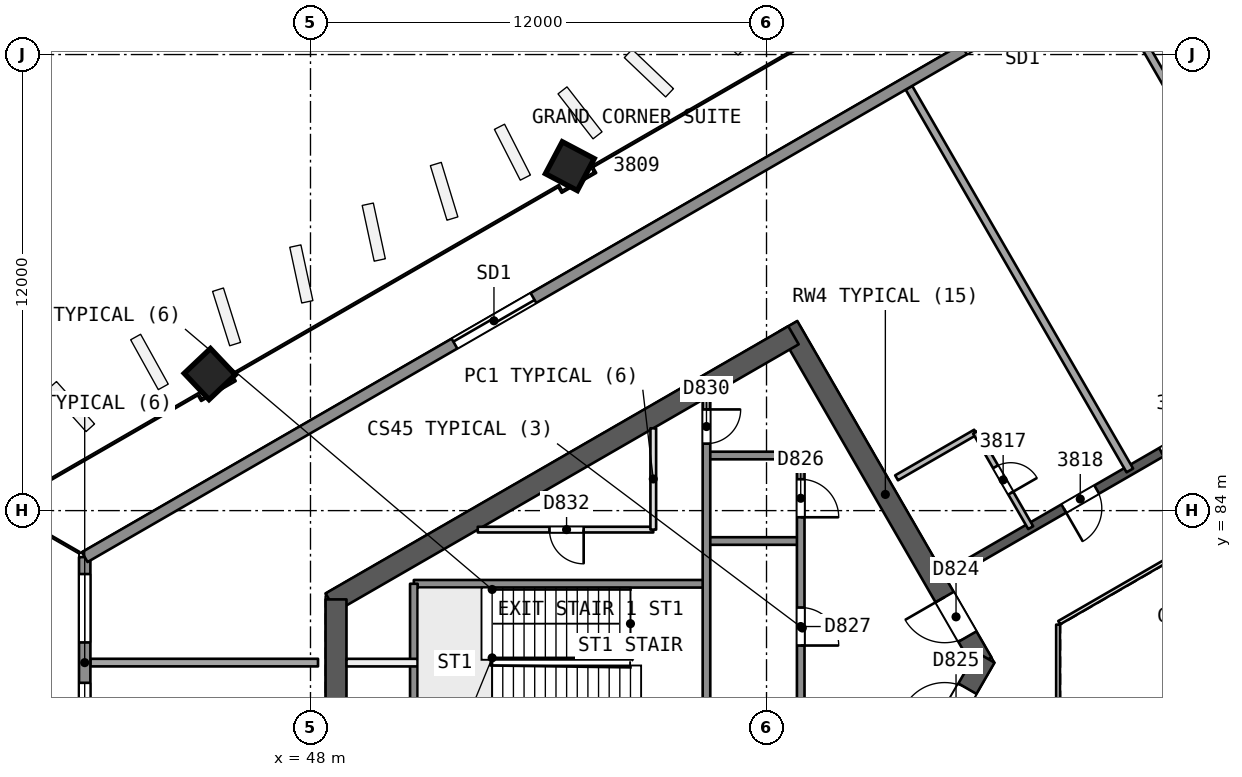
"""IFC4 building model, lengths in metres.
Left out: names, types, materials, properties, quantities, classifications, styles, units other than length and angle.
Written with IfcOpenShell. Run it as: python <this file> out.ifc"""

import sys

from ifc_helpers import new_model, si_unit, direction, frame, frame_2d, origin, origin_2d, place, context, subcontext, project, spatial, rectangle, extrude, element, fill, save


model = new_model("IFC4")
c1 = context("Model", 3, precision=1e-05, world=origin(), true_north=direction((0.0, 1.0)))
c2 = subcontext(c1, "Body", "Model", "MODEL_VIEW")
j1 = project(units=[si_unit("LENGTHUNIT", "METRE"), si_unit("PLANEANGLEUNIT", "RADIAN")], contexts=[c1])
p1 = place(None, origin())
s1 = spatial("IfcSite", under=j1, at=p1, CompositionType="ELEMENT")
p2 = place(p1, origin())
s2 = spatial("IfcBuilding", under=s1, at=p2, CompositionType="ELEMENT")
p3 = place(p2, frame((0.0, 0.0, 160.0)))
s3 = spatial("IfcBuildingStorey", under=s2, at=p3, CompositionType="ELEMENT", Elevation=160.0)
p4 = place(p3, frame((65.682, 80.0, 0.0), z_axis=(0.0, 0.0, 1.0), x_axis=(-0.500000202252, 0.866025287014, 0.0)))
e1 = element("IfcWall", 1, at=p4, inside=s3, PredefinedType="SHEAR", context=c2, shape_type="SweptSolid", body=[
    extrude(rectangle(XDim=10.221, YDim=0.55, at=frame_2d((5.111, 0.0))), origin(), (0.0, 0.0, 1.0), 3.7),
])
p5 = place(p4, frame((0.791, 0.0, 0.0)))
e2 = element("IfcOpeningElement", 2, at=p5, cuts=e1, PredefinedType="OPENING", context=c2, shape_type="SweptSolid", body=[
    extrude(rectangle(XDim=1.2, YDim=2.1, at=frame_2d((0.6, 1.05))), frame((0.0, 0.286, 0.0), z_axis=(0.0, -1.0, 0.0), x_axis=(1.0, 0.0, 0.0)), (0.0, 0.0, 1.0), 0.571),
])
p6 = place(p3, frame((60.709, 88.614, 0.0), z_axis=(0.0, 0.0, 1.0), x_axis=(-0.866020164116, -0.500009075263, 0.0)))
e3 = element("IfcWall", 3, at=p6, inside=s3, PredefinedType="SHEAR", context=c2, shape_type="SweptSolid", body=[
    extrude(rectangle(XDim=14.058, YDim=0.55, at=frame_2d((7.029, 0.0))), origin(), (0.0, 0.0, 1.0), 3.7),
])
p7 = place(p3, frame((48.672, 81.664, 0.0), z_axis=(0.0, 0.0, 1.0), x_axis=(0.0, -1.0, 0.0)))
e4 = element("IfcWall", 4, at=p7, inside=s3, PredefinedType="SHEAR", context=c2, shape_type="SweptSolid", body=[
    extrude(rectangle(XDim=3.487, YDim=0.55, at=frame_2d((1.743, 0.0))), origin(), (0.0, 0.0, 1.0), 3.7),
])
p8 = place(p3, frame((60.709, 71.386, 0.0), z_axis=(0.0, 0.0, 1.0), x_axis=(0.500015938302, 0.866016201606, 0.0)))
e5 = element("IfcWall", 5, at=p8, inside=s3, PredefinedType="SHEAR", context=c2, shape_type="SweptSolid", body=[
    extrude(rectangle(XDim=10.105, YDim=0.55, at=frame_2d((5.053, 0.0))), origin(), (0.0, 0.0, 1.0), 3.7),
])
p9 = place(p8, frame((7.955, 0.0, 0.0)))
e6 = element("IfcOpeningElement", 6, at=p9, cuts=e5, PredefinedType="OPENING", context=c2, shape_type="SweptSolid", body=[
    extrude(rectangle(XDim=1.2, YDim=2.1, at=frame_2d((0.6, 1.05))), frame((0.0, 0.286, 0.0), z_axis=(0.0, -1.0, 0.0), x_axis=(1.0, 0.0, 0.0)), (0.0, 0.0, 1.0), 0.571),
])
p10 = place(p3, frame((78.2, 90.046, 0.0), z_axis=(0.0, 0.0, 1.0), x_axis=(-0.866026492143, -0.499998114903, 0.0)))
e7 = element("IfcWall", 7, at=p10, inside=s3, PredefinedType="SHEAR", context=c2, shape_type="SweptSolid", body=[
    extrude(rectangle(XDim=15.588, YDim=0.25, at=frame_2d((7.794, 0.0))), origin(), (0.0, 0.0, 1.0), 3.25),
])
p11 = place(p10, frame((1.527, 0.0, 0.0)))
e8 = element("IfcOpeningElement", 8, at=p11, cuts=e7, PredefinedType="OPENING", context=c2, shape_type="SweptSolid", body=[
    extrude(rectangle(XDim=1.0, YDim=2.1, at=frame_2d((0.5, 1.05))), frame((0.0, 0.135, 0.0), z_axis=(0.0, -1.0, 0.0), x_axis=(1.0, 0.0, 0.0)), (0.0, 0.0, 1.0), 0.271),
])
p12 = place(p10, frame((7.915, 0.0, 0.0)))
e9 = element("IfcOpeningElement", 9, at=p12, cuts=e7, PredefinedType="OPENING", context=c2, shape_type="SweptSolid", body=[
    extrude(rectangle(XDim=1.1, YDim=2.1, at=frame_2d((0.55, 1.05))), frame((0.0, 0.135, 0.0), z_axis=(0.0, -1.0, 0.0), x_axis=(1.0, 0.0, 0.0)), (0.0, 0.0, 1.0), 0.271),
])
p13 = place(p10, frame((10.982, 0.0, 0.0)))
e10 = element("IfcOpeningElement", 10, at=p13, cuts=e7, PredefinedType="OPENING", context=c2, shape_type="SweptSolid", body=[
    extrude(rectangle(XDim=1.0, YDim=2.1, at=frame_2d((0.5, 1.05))), frame((0.0, 0.135, 0.0), z_axis=(0.0, -1.0, 0.0), x_axis=(1.0, 0.0, 0.0)), (0.0, 0.0, 1.0), 0.271),
])
p14 = place(p3, frame((54.801, 93.078, 0.0), z_axis=(0.019328516974, -0.012138044789, 0.999739504221), x_axis=(-0.500208848309, 0.865669585777, 0.020181088508)))
e11 = element("IfcColumn", 11, at=p14, inside=s3, PredefinedType="COLUMN", context=c2, shape_type="SweptSolid", body=[
    extrude(rectangle(XDim=0.95, YDim=0.95, at=origin_2d()), origin(), (0.0, 0.0, 1.0), 3.701),
])
p15 = place(p3, frame((45.315, 87.601, 0.0), z_axis=(0.02855911485, -0.006793507689, 0.999569019734), x_axis=(-0.500413533487, 0.865551301346, 0.020180194262)))
e12 = element("IfcColumn", 12, at=p15, inside=s3, PredefinedType="COLUMN", context=c2, shape_type="SweptSolid", body=[
    extrude(rectangle(XDim=0.95, YDim=0.95, at=origin_2d()), origin(), (0.0, 0.0, 1.0), 3.702),
])
p16 = place(p3, frame((68.877, 98.088, 0.0), z_axis=(0.0, 0.0, 1.0), x_axis=(0.500001735503, -0.866024401789, 0.0)))
e13 = element("IfcWall", 13, at=p16, inside=s3, PredefinedType="PARTITIONING", context=c2, shape_type="SweptSolid", body=[
    extrude(rectangle(XDim=8.626, YDim=0.2, at=frame_2d((4.313, 0.0))), origin(), (0.0, 0.0, 1.0), 3.25),
])
p17 = place(p3, frame((63.747, 95.126, 0.0), z_axis=(0.0, 0.0, 1.0), x_axis=(0.4999987432, -0.866026129397, 0.0)))
e14 = element("IfcWall", 14, at=p17, inside=s3, PredefinedType="PARTITIONING", context=c2, shape_type="SweptSolid", body=[
    extrude(rectangle(XDim=11.626, YDim=0.2, at=frame_2d((5.813, 0.0))), origin(), (0.0, 0.0, 1.0), 3.25),
])
p18 = place(p3, frame((63.422, 84.863, 0.0), z_axis=(0.0, 0.0, 1.0), x_axis=(0.865994240961, 0.500053971709, 0.0)))
e15 = element("IfcWall", 15, at=p18, inside=s3, PredefinedType="PARTITIONING", context=c2, shape_type="SweptSolid", body=[
    extrude(rectangle(XDim=2.401, YDim=0.15, at=frame_2d((1.201, 0.0))), origin(), (0.0, 0.0, 1.0), 3.25),
])
p19 = place(p3, frame((65.502, 86.063, 0.0), z_axis=(0.0, 0.0, 1.0), x_axis=(0.499987231761, -0.866032775405, 0.0)))
e16 = element("IfcWall", 16, at=p19, inside=s3, PredefinedType="PARTITIONING", context=c2, shape_type="SweptSolid", body=[
    extrude(rectangle(XDim=2.9, YDim=0.15, at=frame_2d((1.45, 0.0))), origin(), (0.0, 0.0, 1.0), 3.25),
])
p20 = place(p19, frame((1.05, 0.0, 0.0)))
e17 = element("IfcOpeningElement", 17, at=p20, cuts=e16, PredefinedType="OPENING", context=c2, shape_type="SweptSolid", body=[
    extrude(rectangle(XDim=0.8, YDim=2.1, at=frame_2d((0.4, 1.05))), frame((0.0, 0.085, 0.0), z_axis=(0.0, -1.0, 0.0), x_axis=(1.0, 0.0, 0.0)), (0.0, 0.0, 1.0), 0.171),
])
p21 = place(p3, frame((42.208, 80.001, 0.0), z_axis=(0.0, 0.0, 1.0), x_axis=(1.0, 0.0, 0.0)))
e18 = element("IfcWall", 18, at=p21, inside=s3, PredefinedType="PARTITIONING", context=c2, shape_type="SweptSolid", body=[
    extrude(rectangle(XDim=5.99, YDim=0.2, at=frame_2d((2.995, 0.0))), origin(), (0.0, 0.0, 1.0), 3.25),
])
p22 = place(p3, frame((42.059, 77.223, 0.0), z_axis=(0.0, 0.0, 1.0), x_axis=(0.0, 1.0, 0.0)))
e19 = element("IfcWall", 19, at=p22, inside=s3, PredefinedType="SOLIDWALL", context=c2, shape_type="SweptSolid", body=[
    extrude(rectangle(XDim=5.554, YDim=0.3, at=frame_2d((2.777, 0.0))), origin(), (0.0, 0.0, 1.0), 3.25),
])
p23 = place(p22, frame((0.446, 0.0, 0.9)))
e20 = element("IfcOpeningElement", 20, at=p23, cuts=e19, PredefinedType="OPENING", context=c2, shape_type="SweptSolid", body=[
    extrude(rectangle(XDim=1.8, YDim=1.5, at=frame_2d((0.9, 0.75))), frame((0.0, 0.161, 0.0), z_axis=(0.0, -1.0, 0.0), x_axis=(1.0, 0.0, 0.0)), (0.0, 0.0, 1.0), 0.321),
])
p24 = place(p22, frame((3.308, 0.0, 0.9)))
e21 = element("IfcOpeningElement", 21, at=p24, cuts=e19, PredefinedType="OPENING", context=c2, shape_type="SweptSolid", body=[
    extrude(rectangle(XDim=1.8, YDim=1.5, at=frame_2d((0.9, 0.75))), frame((0.0, 0.161, 0.0), z_axis=(0.0, -1.0, 0.0), x_axis=(1.0, 0.0, 0.0)), (0.0, 0.0, 1.0), 0.321),
])
p25 = place(p3, frame((42.059, 82.777, 0.0), z_axis=(0.0, 0.0, 1.0), x_axis=(0.866025745652, 0.499999407868, 0.0)))
e22 = element("IfcWall", 22, at=p25, inside=s3, PredefinedType="SOLIDWALL", context=c2, shape_type="SweptSolid", body=[
    extrude(rectangle(XDim=54.279, YDim=0.3, at=frame_2d((27.14, 0.0))), origin(), (0.0, 0.0, 1.0), 3.25),
])
p26 = place(p25, frame((26.719, 0.0, 0.0)))
e23 = element("IfcOpeningElement", 23, at=p26, cuts=e22, PredefinedType="OPENING", context=c2, shape_type="SweptSolid", body=[
    extrude(rectangle(XDim=2.4, YDim=2.4, at=frame_2d((1.2, 1.2))), frame((0.0, 0.161, 0.0), z_axis=(0.0, -1.0, 0.0), x_axis=(1.0, 0.0, 0.0)), (0.0, 0.0, 1.0), 0.321),
])
p27 = place(p25, frame((31.708, 0.0, 0.0)))
e24 = element("IfcOpeningElement", 24, at=p27, cuts=e22, PredefinedType="OPENING", context=c2, shape_type="SweptSolid", body=[
    extrude(rectangle(XDim=2.4, YDim=2.4, at=frame_2d((1.2, 1.2))), frame((0.0, 0.161, 0.0), z_axis=(0.0, -1.0, 0.0), x_axis=(1.0, 0.0, 0.0)), (0.0, 0.0, 1.0), 0.321),
])
p28 = place(p25, frame((42.175, 0.0, 0.0)))
e25 = element("IfcOpeningElement", 25, at=p28, cuts=e22, PredefinedType="OPENING", context=c2, shape_type="SweptSolid", body=[
    extrude(rectangle(XDim=2.4, YDim=2.4, at=frame_2d((1.2, 1.2))), frame((0.0, 0.161, 0.0), z_axis=(0.0, -1.0, 0.0), x_axis=(1.0, 0.0, 0.0)), (0.0, 0.0, 1.0), 0.321),
])
p29 = place(p25, frame((11.235, 0.0, 0.0)))
e26 = element("IfcOpeningElement", 26, at=p29, cuts=e22, PredefinedType="OPENING", context=c2, shape_type="SweptSolid", body=[
    extrude(rectangle(XDim=2.4, YDim=2.4, at=frame_2d((1.2, 1.2))), frame((0.0, 0.161, 0.0), z_axis=(0.0, -1.0, 0.0), x_axis=(1.0, 0.0, 0.0)), (0.0, 0.0, 1.0), 0.321),
])
p30 = place(p3, frame((60.9, 85.45, 0.0), z_axis=(0.0, 0.0, 1.0), x_axis=(-1.0, 0.0, 0.0)))
e27 = element("IfcWall", 27, at=p30, inside=s3, PredefinedType="SOLIDWALL", context=c2, shape_type="SweptSolid", body=[
    extrude(rectangle(XDim=2.48, YDim=0.2, at=frame_2d((1.24, 0.0))), origin(), (0.0, 0.0, 1.0), 3.25),
])
p31 = place(p3, frame((57.02, 83.5, 0.0), z_axis=(0.0, 0.0, 1.0), x_axis=(-1.0, 0.0, 0.0)))
e28 = element("IfcWall", 28, at=p31, inside=s3, PredefinedType="PARTITIONING", context=c2, shape_type="SweptSolid", body=[
    extrude(rectangle(XDim=4.618, YDim=0.15, at=frame_2d((2.309, 0.0))), origin(), (0.0, 0.0, 1.0), 3.25),
])
p32 = place(p31, frame((1.832, 0.0, 0.0)))
e29 = element("IfcOpeningElement", 29, at=p32, cuts=e28, PredefinedType="OPENING", context=c2, shape_type="SweptSolid", body=[
    extrude(rectangle(XDim=0.9, YDim=2.1, at=frame_2d((0.45, 1.05))), frame((0.0, 0.085, 0.0), z_axis=(0.0, -1.0, 0.0), x_axis=(1.0, 0.0, 0.0)), (0.0, 0.0, 1.0), 0.171),
])
p33 = place(p3, frame((60.9, 83.2, 0.0), z_axis=(0.0, 0.0, 1.0), x_axis=(-1.0, 0.0, 0.0)))
e30 = element("IfcWall", 30, at=p33, inside=s3, PredefinedType="SOLIDWALL", context=c2, shape_type="SweptSolid", body=[
    extrude(rectangle(XDim=2.48, YDim=0.2, at=frame_2d((1.24, 0.0))), origin(), (0.0, 0.0, 1.0), 3.25),
])
p34 = place(p3, frame((58.42, 82.075, 0.0), z_axis=(0.0, 0.0, 1.0), x_axis=(-1.0, 0.0, 0.0)))
e31 = element("IfcWall", 31, at=p34, inside=s3, PredefinedType="SOLIDWALL", context=c2, shape_type="SweptSolid", body=[
    extrude(rectangle(XDim=7.7, YDim=0.2, at=frame_2d((3.85, 0.0))), origin(), (0.0, 0.0, 1.0), 3.25),
])
p35 = place(p3, frame((50.82, 80.0, 0.0), z_axis=(0.0, 0.0, 1.0), x_axis=(-1.0, 0.0, 0.0)))
e32 = element("IfcWall", 32, at=p35, inside=s3, PredefinedType="PARTITIONING", context=c2, shape_type="SweptSolid", body=[
    extrude(rectangle(XDim=1.873, YDim=0.2, at=frame_2d((0.937, 0.0))), origin(), (0.0, 0.0, 1.0), 3.25),
])
p36 = place(p3, frame((60.9, 85.45, 0.0), z_axis=(0.0, 0.0, 1.0), x_axis=(0.0, -1.0, 0.0)))
e33 = element("IfcWall", 33, at=p36, inside=s3, PredefinedType="SOLIDWALL", context=c2, shape_type="SweptSolid", body=[
    extrude(rectangle(XDim=10.9, YDim=0.2, at=frame_2d((5.45, 0.0))), origin(), (0.0, 0.0, 1.0), 3.25),
])
p37 = place(p36, frame((0.625, 0.0, 0.0)))
e34 = element("IfcOpeningElement", 34, at=p37, cuts=e33, PredefinedType="OPENING", context=c2, shape_type="SweptSolid", body=[
    extrude(rectangle(XDim=1.0, YDim=2.1, at=frame_2d((0.5, 1.05))), frame((0.0, 0.11, 0.0), z_axis=(0.0, -1.0, 0.0), x_axis=(1.0, 0.0, 0.0)), (0.0, 0.0, 1.0), 0.221),
])
p38 = place(p36, frame((4.0, 0.0, 0.0)))
e35 = element("IfcOpeningElement", 35, at=p38, cuts=e33, PredefinedType="OPENING", context=c2, shape_type="SweptSolid", body=[
    extrude(rectangle(XDim=1.0, YDim=2.1, at=frame_2d((0.5, 1.05))), frame((0.0, 0.11, 0.0), z_axis=(0.0, -1.0, 0.0), x_axis=(1.0, 0.0, 0.0)), (0.0, 0.0, 1.0), 0.221),
])
p39 = place(p36, frame((7.375, 0.0, 0.0)))
e36 = element("IfcOpeningElement", 36, at=p39, cuts=e33, PredefinedType="OPENING", context=c2, shape_type="SweptSolid", body=[
    extrude(rectangle(XDim=1.0, YDim=2.1, at=frame_2d((0.5, 1.05))), frame((0.0, 0.11, 0.0), z_axis=(0.0, -1.0, 0.0), x_axis=(1.0, 0.0, 0.0)), (0.0, 0.0, 1.0), 0.221),
])
p40 = place(p3, frame((58.42, 86.974, 0.0), z_axis=(0.0, 0.0, 1.0), x_axis=(0.0, -1.0, 0.0)))
e37 = element("IfcWall", 37, at=p40, inside=s3, PredefinedType="SOLIDWALL", context=c2, shape_type="SweptSolid", body=[
    extrude(rectangle(XDim=10.524, YDim=0.2, at=frame_2d((5.262, 0.0))), origin(), (0.0, 0.0, 1.0), 3.25),
])
p41 = place(p40, frame((0.312, 0.0, 0.0)))
e38 = element("IfcOpeningElement", 38, at=p41, cuts=e37, PredefinedType="OPENING", context=c2, shape_type="SweptSolid", body=[
    extrude(rectangle(XDim=0.9, YDim=2.1, at=frame_2d((0.45, 1.05))), frame((0.0, 0.11, 0.0), z_axis=(0.0, -1.0, 0.0), x_axis=(1.0, 0.0, 0.0)), (0.0, 0.0, 1.0), 0.221),
])
p42 = place(p3, frame((57.02, 86.166, 0.0), z_axis=(0.0, 0.0, 1.0), x_axis=(0.0, -1.0, 0.0)))
e39 = element("IfcWall", 39, at=p42, inside=s3, PredefinedType="PARTITIONING", context=c2, shape_type="SweptSolid", body=[
    extrude(rectangle(XDim=2.666, YDim=0.15, at=frame_2d((1.333, 0.0))), origin(), (0.0, 0.0, 1.0), 3.25),
])
p43 = place(p3, frame((50.72, 82.075, 0.0), z_axis=(0.0, 0.0, 1.0), x_axis=(0.0, -1.0, 0.0)))
e40 = element("IfcWall", 40, at=p43, inside=s3, PredefinedType="SOLIDWALL", context=c2, shape_type="SweptSolid", body=[
    extrude(rectangle(XDim=4.15, YDim=0.2, at=frame_2d((2.075, 0.0))), origin(), (0.0, 0.0, 1.0), 3.25),
])
p44 = place(p3, frame((77.738, 86.846, 0.0), z_axis=(0.0, 0.0, 1.0), x_axis=(-0.866026658274, -0.499997827154, 0.0)))
e41 = element("IfcWall", 41, at=p44, inside=s3, PredefinedType="PARTITIONING", context=c2, shape_type="SweptSolid", body=[
    extrude(rectangle(XDim=11.588, YDim=0.1, at=frame_2d((5.794, 0.0))), origin(), (0.0, 0.0, 1.0), 3.25),
])
p45 = place(p3, frame((67.672, 81.0, 0.0), z_axis=(0.0, 0.0, 1.0), x_axis=(0.0, -1.0, 0.0)))
e42 = element("IfcWall", 42, at=p45, inside=s3, PredefinedType="PARTITIONING", context=c2, shape_type="SweptSolid", body=[
    extrude(rectangle(XDim=2.0, YDim=0.1, at=frame_2d((1.0, 0.0))), origin(), (0.0, 0.0, 1.0), 3.25),
])
p46 = place(p12, origin())
e43 = element("IfcDoor", 43, at=p46, inside=s3, OperationType="SINGLE_SWING_RIGHT", PredefinedType="NOTDEFINED", context=c2, shape_type="SweptSolid", body=[
    extrude(rectangle(XDim=1.1, YDim=2.1, at=frame_2d((0.55, 1.05))), frame((0.0, 0.025, 0.0), z_axis=(0.0, -1.0, 0.0), x_axis=(1.0, 0.0, 0.0)), (0.0, 0.0, 1.0), 0.05),
])
fill(e9, e43)
p47 = place(p20, origin())
e44 = element("IfcDoor", 44, at=p47, inside=s3, OperationType="SINGLE_SWING_RIGHT", PredefinedType="NOTDEFINED", context=c2, shape_type="SweptSolid", body=[
    extrude(rectangle(XDim=0.8, YDim=2.1, at=frame_2d((0.4, 1.05))), frame((0.0, 0.025, 0.0), z_axis=(0.0, -1.0, 0.0), x_axis=(1.0, 0.0, 0.0)), (0.0, 0.0, 1.0), 0.05),
])
fill(e17, e44)
p48 = place(p13, origin())
e45 = element("IfcDoor", 45, at=p48, inside=s3, OperationType="SINGLE_SWING_RIGHT", PredefinedType="NOTDEFINED", context=c2, shape_type="SweptSolid", body=[
    extrude(rectangle(XDim=1.0, YDim=2.1, at=frame_2d((0.5, 1.05))), frame((0.0, 0.025, 0.0), z_axis=(0.0, -1.0, 0.0), x_axis=(1.0, 0.0, 0.0)), (0.0, 0.0, 1.0), 0.05),
])
fill(e10, e45)
p49 = place(p23, origin())
e46 = element("IfcWindow", 46, at=p49, inside=s3, PartitioningType="SINGLE_PANEL", PredefinedType="WINDOW", context=c2, shape_type="SweptSolid", body=[
    extrude(rectangle(XDim=1.8, YDim=1.5, at=frame_2d((0.9, 0.75))), frame((0.0, 0.03, 0.0), z_axis=(0.0, -1.0, 0.0), x_axis=(1.0, 0.0, 0.0)), (0.0, 0.0, 1.0), 0.06),
])
fill(e20, e46)
p50 = place(p24, origin())
e47 = element("IfcWindow", 47, at=p50, inside=s3, PartitioningType="SINGLE_PANEL", PredefinedType="WINDOW", context=c2, shape_type="SweptSolid", body=[
    extrude(rectangle(XDim=1.8, YDim=1.5, at=frame_2d((0.9, 0.75))), frame((0.0, 0.03, 0.0), z_axis=(0.0, -1.0, 0.0), x_axis=(1.0, 0.0, 0.0)), (0.0, 0.0, 1.0), 0.06),
])
fill(e21, e47)
p51 = place(p29, origin())
e48 = element("IfcDoor", 48, at=p51, inside=s3, OperationType="SLIDING_TO_RIGHT", PredefinedType="NOTDEFINED", context=c2, shape_type="SweptSolid", body=[
    extrude(rectangle(XDim=2.4, YDim=2.4, at=frame_2d((1.2, 1.2))), frame((0.0, 0.025, 0.0), z_axis=(0.0, -1.0, 0.0), x_axis=(1.0, 0.0, 0.0)), (0.0, 0.0, 1.0), 0.05),
])
fill(e26, e48)
p52 = place(p5, origin())
e49 = element("IfcDoor", 49, at=p52, inside=s3, OperationType="SINGLE_SWING_RIGHT", PredefinedType="NOTDEFINED", context=c2, shape_type="SweptSolid", body=[
    extrude(rectangle(XDim=1.2, YDim=2.1, at=frame_2d((0.6, 1.05))), frame((0.0, 0.025, 0.0), z_axis=(0.0, -1.0, 0.0), x_axis=(1.0, 0.0, 0.0)), (0.0, 0.0, 1.0), 0.05),
])
fill(e2, e49)
p53 = place(p9, origin())
e50 = element("IfcDoor", 50, at=p53, inside=s3, OperationType="SINGLE_SWING_LEFT", PredefinedType="NOTDEFINED", context=c2, shape_type="SweptSolid", body=[
    extrude(rectangle(XDim=1.2, YDim=2.1, at=frame_2d((0.6, 1.05))), frame((0.0, 0.025, 0.0), z_axis=(0.0, -1.0, 0.0), x_axis=(1.0, 0.0, 0.0)), (0.0, 0.0, 1.0), 0.05),
])
fill(e6, e50)
p54 = place(p37, origin())
e51 = element("IfcDoor", 51, at=p54, inside=s3, OperationType="SINGLE_SWING_RIGHT", PredefinedType="NOTDEFINED", context=c2, shape_type="SweptSolid", body=[
    extrude(rectangle(XDim=1.0, YDim=2.1, at=frame_2d((0.5, 1.05))), frame((0.0, 0.025, 0.0), z_axis=(0.0, -1.0, 0.0), x_axis=(1.0, 0.0, 0.0)), (0.0, 0.0, 1.0), 0.05),
])
fill(e34, e51)
p55 = place(p38, origin())
e52 = element("IfcDoor", 52, at=p55, inside=s3, OperationType="SINGLE_SWING_RIGHT", PredefinedType="NOTDEFINED", context=c2, shape_type="SweptSolid", body=[
    extrude(rectangle(XDim=1.0, YDim=2.1, at=frame_2d((0.5, 1.05))), frame((0.0, 0.025, 0.0), z_axis=(0.0, -1.0, 0.0), x_axis=(1.0, 0.0, 0.0)), (0.0, 0.0, 1.0), 0.05),
])
fill(e35, e52)
p56 = place(p41, origin())
e53 = element("IfcDoor", 53, at=p56, inside=s3, OperationType="SINGLE_SWING_LEFT", PredefinedType="NOTDEFINED", context=c2, shape_type="SweptSolid", body=[
    extrude(rectangle(XDim=0.9, YDim=2.1, at=frame_2d((0.45, 1.05))), frame((0.0, 0.025, 0.0), z_axis=(0.0, -1.0, 0.0), x_axis=(1.0, 0.0, 0.0)), (0.0, 0.0, 1.0), 0.05),
])
fill(e38, e53)
p57 = place(p32, origin())
e54 = element("IfcDoor", 54, at=p57, inside=s3, OperationType="SINGLE_SWING_LEFT", PredefinedType="NOTDEFINED", context=c2, shape_type="SweptSolid", body=[
    extrude(rectangle(XDim=0.9, YDim=2.1, at=frame_2d((0.45, 1.05))), frame((0.0, 0.025, 0.0), z_axis=(0.0, -1.0, 0.0), x_axis=(1.0, 0.0, 0.0)), (0.0, 0.0, 1.0), 0.05),
])
fill(e29, e54)
save(model, sys.argv[1])
